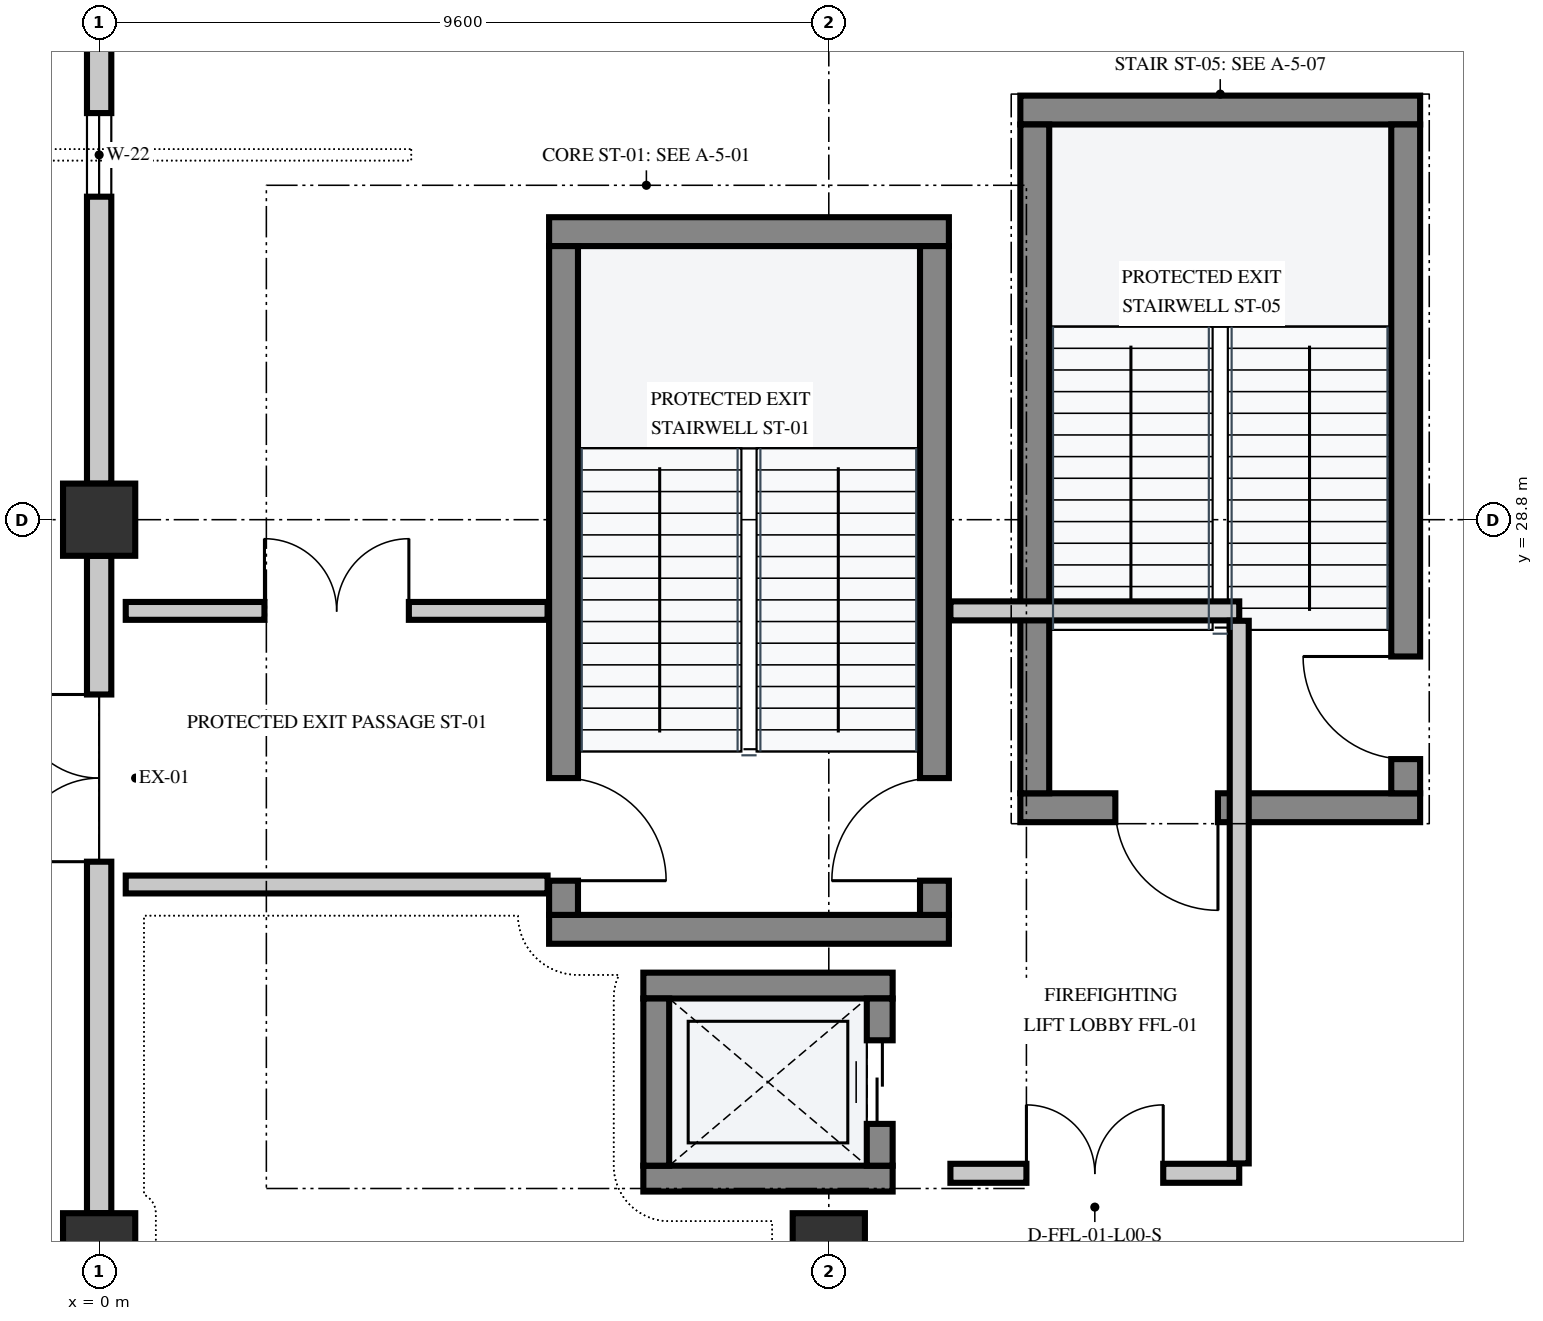
"""IFC4 building model, lengths in metres.
Left out: names, types, materials, properties, quantities, classifications, styles, units other than length and angle.
Written with IfcOpenShell. Run it as: python <this file> out.ifc"""

import sys

from ifc_helpers import new_model, si_unit, direction, frame, frame_2d, origin, origin_2d, place, context, subcontext, project, spatial, rectangle, extrude, element, fill, save


model = new_model("IFC4")
c1 = context("Model", 3, precision=1e-05, world=origin(), true_north=direction((0.0, 1.0)))
c2 = subcontext(c1, "Body", "Model", "MODEL_VIEW")
j1 = project(units=[si_unit("LENGTHUNIT", "METRE"), si_unit("PLANEANGLEUNIT", "RADIAN")], contexts=[c1])
p1 = place(None, origin())
s1 = spatial("IfcSite", under=j1, at=p1, CompositionType="ELEMENT")
p2 = place(p1, origin())
s2 = spatial("IfcBuilding", under=s1, at=p2, CompositionType="ELEMENT")
p3 = place(p2, origin())
s3 = spatial("IfcBuildingStorey", under=s2, at=p3, CompositionType="ELEMENT", Elevation=0.0)
for number, where, z_axis, x_axis in (
    (1, (0.0, 19.2, 0.0), (0.0, 0.0, 1.0), (1.0, 0.0, 0.0)),
    (2, (0.0, 28.8, 0.0), (0.0, 0.0, 1.0), (1.0, 0.0, 0.0)),
    (3, (9.6, 19.2, 0.0), (0.0, 0.0, 1.0), (1.0, 0.0, 0.0)),
):
    element("IfcColumn", number, at=place(p3, frame(where, z_axis=z_axis, x_axis=x_axis)), inside=s3, PredefinedType="COLUMN", context=c2, shape_type="SweptSolid", body=[
        extrude(rectangle(XDim=0.95, YDim=0.95, at=origin_2d()), origin(), (0.0, 0.0, 1.0), 5.4),
    ])
p4 = place(p3, frame((0.0, 19.675, 0.0), z_axis=(0.0, 0.0, 1.0), x_axis=(0.0, 1.0, 0.0)))
e4 = element("IfcWall", 4, at=p4, inside=s3, PredefinedType="SOLIDWALL", context=c2, shape_type="SweptSolid", body=[
    extrude(rectangle(XDim=8.65, YDim=0.32, at=frame_2d((4.325, 0.0))), origin(), (0.0, 0.0, 1.0), 5.09),
])
p5 = place(p4, frame((4.625, 0.0, 0.0)))
e5 = element("IfcOpeningElement", 5, at=p5, cuts=e4, PredefinedType="OPENING", context=c2, shape_type="SweptSolid", body=[
    extrude(rectangle(XDim=2.2, YDim=2.4, at=frame_2d((1.1, 1.2))), frame((0.0, 0.172, 0.0), z_axis=(0.0, -1.0, 0.0), x_axis=(1.0, 0.0, 0.0)), (0.0, 0.0, 1.0), 0.344),
])
p6 = place(p3, frame((0.0, 29.273, 0.0), z_axis=(0.0, 0.0, 1.0), x_axis=(0.0, 1.0, 0.0)))
e6 = element("IfcWall", 6, at=p6, inside=s3, PredefinedType="SOLIDWALL", context=c2, shape_type="SweptSolid", body=[
    extrude(rectangle(XDim=8.654, YDim=0.32, at=frame_2d((4.327, 0.0))), origin(), (0.0, 0.0, 1.0), 5.09),
])
p7 = place(p6, frame((3.777, 0.0, 1.25)))
e7 = element("IfcOpeningElement", 7, at=p7, cuts=e6, PredefinedType="OPENING", context=c2, shape_type="SweptSolid", body=[
    extrude(rectangle(XDim=1.1, YDim=1.35, at=frame_2d((0.55, 0.675))), frame((0.0, 0.172, 0.0), z_axis=(0.0, -1.0, 0.0), x_axis=(1.0, 0.0, 0.0)), (0.0, 0.0, 1.0), 0.344),
])
for number, where, z_axis, x_axis in (
    (8, (5.92, 23.41, 0.0), (0.0, 0.0, 1.0), (1.0, 0.0, 0.0)),
    (9, (5.92, 32.59, 0.0), (0.0, 0.0, 1.0), (1.0, 0.0, 0.0)),
):
    element("IfcWall", number, at=place(p3, frame(where, z_axis=z_axis, x_axis=x_axis)), inside=s3, PredefinedType="SHEAR", context=c2, shape_type="SweptSolid", body=[
        extrude(rectangle(XDim=5.26, YDim=0.38, at=frame_2d((2.63, 0.0))), origin(), (0.0, 0.0, 1.0), 5.09),
    ])
p8 = place(p3, frame((10.99, 23.6, 0.0), z_axis=(0.0, 0.0, 1.0), x_axis=(0.0, 1.0, 0.0)))
e10 = element("IfcWall", 10, at=p8, inside=s3, PredefinedType="SHEAR", context=c2, shape_type="SweptSolid", body=[
    extrude(rectangle(XDim=8.8, YDim=0.38, at=frame_2d((4.4, 0.0))), origin(), (0.0, 0.0, 1.0), 5.09),
])
p9 = place(p8, frame((0.45, 0.0, 0.0)))
e11 = element("IfcOpeningElement", 11, at=p9, cuts=e10, PredefinedType="OPENING", context=c2, shape_type="SweptSolid", body=[
    extrude(rectangle(XDim=1.35, YDim=2.2, at=frame_2d((0.675, 1.1))), frame((0.0, 0.202, 0.0), z_axis=(0.0, -1.0, 0.0), x_axis=(1.0, 0.0, 0.0)), (0.0, 0.0, 1.0), 0.404),
])
p10 = place(p3, frame((6.11, 23.6, 0.0), z_axis=(0.0, 0.0, 1.0), x_axis=(0.0, 1.0, 0.0)))
e12 = element("IfcWall", 12, at=p10, inside=s3, PredefinedType="SHEAR", context=c2, shape_type="SweptSolid", body=[
    extrude(rectangle(XDim=8.8, YDim=0.38, at=frame_2d((4.4, 0.0))), origin(), (0.0, 0.0, 1.0), 5.09),
])
p11 = place(p10, frame((0.45, 0.0, 0.0)))
e13 = element("IfcOpeningElement", 13, at=p11, cuts=e12, PredefinedType="OPENING", context=c2, shape_type="SweptSolid", body=[
    extrude(rectangle(XDim=1.35, YDim=2.2, at=frame_2d((0.675, 1.1))), frame((0.0, 0.202, 0.0), z_axis=(0.0, -1.0, 0.0), x_axis=(1.0, 0.0, 0.0)), (0.0, 0.0, 1.0), 0.404),
])
p12 = place(p3, frame((12.12, 25.01, 0.0), z_axis=(0.0, 0.0, 1.0), x_axis=(1.0, 0.0, 0.0)))
e14 = element("IfcWall", 14, at=p12, inside=s3, PredefinedType="SHEAR", context=c2, shape_type="SweptSolid", body=[
    extrude(rectangle(XDim=5.26, YDim=0.38, at=frame_2d((2.63, 0.0))), origin(), (0.0, 0.0, 1.0), 5.09),
])
p13 = place(p12, frame((1.25, 0.0, 0.0)))
e15 = element("IfcOpeningElement", 15, at=p13, cuts=e14, PredefinedType="OPENING", context=c2, shape_type="SweptSolid", body=[
    extrude(rectangle(XDim=1.35, YDim=2.2, at=frame_2d((0.675, 1.1))), frame((0.0, 0.202, 0.0), z_axis=(0.0, -1.0, 0.0), x_axis=(1.0, 0.0, 0.0)), (0.0, 0.0, 1.0), 0.404),
])
p14 = place(p3, frame((12.12, 34.19, 0.0), z_axis=(0.0, 0.0, 1.0), x_axis=(1.0, 0.0, 0.0)))
e16 = element("IfcWall", 16, at=p14, inside=s3, PredefinedType="SHEAR", context=c2, shape_type="SweptSolid", body=[
    extrude(rectangle(XDim=5.26, YDim=0.38, at=frame_2d((2.63, 0.0))), origin(), (0.0, 0.0, 1.0), 5.09),
])
p15 = place(p3, frame((17.19, 25.2, 0.0), z_axis=(0.0, 0.0, 1.0), x_axis=(0.0, 1.0, 0.0)))
e17 = element("IfcWall", 17, at=p15, inside=s3, PredefinedType="SHEAR", context=c2, shape_type="SweptSolid", body=[
    extrude(rectangle(XDim=8.8, YDim=0.38, at=frame_2d((4.4, 0.0))), origin(), (0.0, 0.0, 1.0), 5.09),
])
p16 = place(p15, frame((0.45, 0.0, 0.0)))
e18 = element("IfcOpeningElement", 18, at=p16, cuts=e17, PredefinedType="OPENING", context=c2, shape_type="SweptSolid", body=[
    extrude(rectangle(XDim=1.35, YDim=2.2, at=frame_2d((0.675, 1.1))), frame((0.0, 0.202, 0.0), z_axis=(0.0, -1.0, 0.0), x_axis=(1.0, 0.0, 0.0)), (0.0, 0.0, 1.0), 0.404),
])
p17 = place(p3, frame((12.31, 25.2, 0.0), z_axis=(0.0, 0.0, 1.0), x_axis=(0.0, 1.0, 0.0)))
e19 = element("IfcWall", 19, at=p17, inside=s3, PredefinedType="SHEAR", context=c2, shape_type="SweptSolid", body=[
    extrude(rectangle(XDim=8.8, YDim=0.38, at=frame_2d((4.4, 0.0))), origin(), (0.0, 0.0, 1.0), 5.09),
])
for number, where, z_axis, x_axis in (
    (20, (7.16, 20.13, 0.0), (0.0, 0.0, 1.0), (1.0, 0.0, 0.0)),
    (21, (7.16, 22.67, 0.0), (0.0, 0.0, 1.0), (1.0, 0.0, 0.0)),
):
    element("IfcWall", number, at=place(p3, frame(where, z_axis=z_axis, x_axis=x_axis)), inside=s3, PredefinedType="SHEAR", context=c2, shape_type="SweptSolid", body=[
        extrude(rectangle(XDim=3.28, YDim=0.34, at=frame_2d((1.64, 0.0))), origin(), (0.0, 0.0, 1.0), 5.09),
    ])
p18 = place(p3, frame((7.33, 20.3, 0.0), z_axis=(0.0, 0.0, 1.0), x_axis=(0.0, 1.0, 0.0)))
e22 = element("IfcWall", 22, at=p18, inside=s3, PredefinedType="SHEAR", context=c2, shape_type="SweptSolid", body=[
    extrude(rectangle(XDim=2.2, YDim=0.34, at=frame_2d((1.1, 0.0))), origin(), (0.0, 0.0, 1.0), 5.09),
])
p19 = place(p3, frame((10.27, 20.3, 0.0), z_axis=(0.0, 0.0, 1.0), x_axis=(0.0, 1.0, 0.0)))
e23 = element("IfcWall", 23, at=p19, inside=s3, PredefinedType="SHEAR", context=c2, shape_type="SweptSolid", body=[
    extrude(rectangle(XDim=2.2, YDim=0.34, at=frame_2d((1.1, 0.0))), origin(), (0.0, 0.0, 1.0), 5.09),
])
p20 = place(p19, frame((0.55, 0.0, 0.0)))
e24 = element("IfcOpeningElement", 24, at=p20, cuts=e23, PredefinedType="OPENING", context=c2, shape_type="SweptSolid", body=[
    extrude(rectangle(XDim=1.1, YDim=2.15, at=frame_2d((0.55, 1.075))), frame((0.0, 0.182, 0.0), z_axis=(0.0, -1.0, 0.0), x_axis=(1.0, 0.0, 0.0)), (0.0, 0.0, 1.0), 0.364),
])
p21 = place(p3, frame((11.2, 20.2, 0.0), z_axis=(0.0, 0.0, 1.0), x_axis=(1.0, 0.0, 0.0)))
e25 = element("IfcWall", 25, at=p21, inside=s3, PredefinedType="PARTITIONING", context=c2, shape_type="SweptSolid", body=[
    extrude(rectangle(XDim=3.8, YDim=0.25, at=frame_2d((1.9, 0.0))), origin(), (0.0, 0.0, 1.0), 5.09),
])
p22 = place(p21, frame((1.0, 0.0, 0.0)))
e26 = element("IfcOpeningElement", 26, at=p22, cuts=e25, PredefinedType="OPENING", context=c2, shape_type="SweptSolid", body=[
    extrude(rectangle(XDim=1.8, YDim=2.25, at=frame_2d((0.9, 1.125))), frame((0.0, 0.137, 0.0), z_axis=(0.0, -1.0, 0.0), x_axis=(1.0, 0.0, 0.0)), (0.0, 0.0, 1.0), 0.274),
])
p23 = place(p3, frame((11.2, 27.6, 0.0), z_axis=(0.0, 0.0, 1.0), x_axis=(1.0, 0.0, 0.0)))
e27 = element("IfcWall", 27, at=p23, inside=s3, PredefinedType="PARTITIONING", context=c2, shape_type="SweptSolid", body=[
    extrude(rectangle(XDim=3.8, YDim=0.25, at=frame_2d((1.9, 0.0))), origin(), (0.0, 0.0, 1.0), 5.09),
])
p24 = place(p3, frame((15.0, 20.33, 0.0), z_axis=(0.0, 0.0, 1.0), x_axis=(0.0, 1.0, 0.0)))
e28 = element("IfcWall", 28, at=p24, inside=s3, PredefinedType="PARTITIONING", context=c2, shape_type="SweptSolid", body=[
    extrude(rectangle(XDim=7.14, YDim=0.25, at=frame_2d((3.57, 0.0))), origin(), (0.0, 0.0, 1.0), 5.09),
])
p25 = place(p3, frame((0.35, 24.0, 0.0), z_axis=(0.0, 0.0, 1.0), x_axis=(1.0, 0.0, 0.0)))
e29 = element("IfcWall", 29, at=p25, inside=s3, PredefinedType="PARTITIONING", context=c2, shape_type="SweptSolid", body=[
    extrude(rectangle(XDim=5.55, YDim=0.235, at=frame_2d((2.775, 0.0))), origin(), (0.0, 0.0, 1.0), 5.09),
])
p26 = place(p3, frame((0.35, 27.6, 0.0), z_axis=(0.0, 0.0, 1.0), x_axis=(1.0, 0.0, 0.0)))
e30 = element("IfcWall", 30, at=p26, inside=s3, PredefinedType="PARTITIONING", context=c2, shape_type="SweptSolid", body=[
    extrude(rectangle(XDim=5.55, YDim=0.235, at=frame_2d((2.775, 0.0))), origin(), (0.0, 0.0, 1.0), 5.09),
])
p27 = place(p26, frame((1.825, 0.0, 0.0)))
e31 = element("IfcOpeningElement", 31, at=p27, cuts=e30, PredefinedType="OPENING", context=c2, shape_type="SweptSolid", body=[
    extrude(rectangle(XDim=1.9, YDim=2.25, at=frame_2d((0.95, 1.125))), frame((0.0, 0.129, 0.0), z_axis=(0.0, -1.0, 0.0), x_axis=(1.0, 0.0, 0.0)), (0.0, 0.0, 1.0), 0.259),
])
p28 = place(p5, origin())
e32 = element("IfcDoor", 32, at=p28, inside=s3, OperationType="DOUBLE_DOOR_SINGLE_SWING", PredefinedType="DOOR", context=c2, shape_type="SweptSolid", body=[
    extrude(rectangle(XDim=2.2, YDim=2.4, at=frame_2d((1.1, 1.2))), frame((0.0, 0.025, 0.0), z_axis=(0.0, -1.0, 0.0), x_axis=(1.0, 0.0, 0.0)), (0.0, 0.0, 1.0), 0.05),
])
fill(e5, e32)
p29 = place(p7, origin())
e33 = element("IfcWindow", 33, at=p29, inside=s3, PartitioningType="SINGLE_PANEL", PredefinedType="WINDOW", context=c2, shape_type="SweptSolid", body=[
    extrude(rectangle(XDim=1.1, YDim=1.35, at=frame_2d((0.55, 0.675))), frame((0.0, 0.03, 0.0), z_axis=(0.0, -1.0, 0.0), x_axis=(1.0, 0.0, 0.0)), (0.0, 0.0, 1.0), 0.06),
])
fill(e7, e33)
p30 = place(p9, origin())
e34 = element("IfcDoor", 34, at=p30, inside=s3, OperationType="SINGLE_SWING_LEFT", PredefinedType="DOOR", context=c2, shape_type="SweptSolid", body=[
    extrude(rectangle(XDim=1.35, YDim=2.2, at=frame_2d((0.675, 1.1))), frame((0.0, 0.025, 0.0), z_axis=(0.0, -1.0, 0.0), x_axis=(1.0, 0.0, 0.0)), (0.0, 0.0, 1.0), 0.05),
])
fill(e11, e34)
p31 = place(p11, frame((1.35, 0.0, 0.0), z_axis=(0.0, 0.0, 1.0), x_axis=(-1.0, 0.0, 0.0)))
e35 = element("IfcDoor", 35, at=p31, inside=s3, OperationType="SINGLE_SWING_RIGHT", PredefinedType="DOOR", context=c2, shape_type="SweptSolid", body=[
    extrude(rectangle(XDim=1.35, YDim=2.2, at=frame_2d((0.675, 1.1))), frame((0.0, 0.025, 0.0), z_axis=(0.0, -1.0, 0.0), x_axis=(1.0, 0.0, 0.0)), (0.0, 0.0, 1.0), 0.05),
])
fill(e13, e35)
p32 = place(p16, origin())
e36 = element("IfcDoor", 36, at=p32, inside=s3, OperationType="SINGLE_SWING_RIGHT", PredefinedType="DOOR", context=c2, shape_type="SweptSolid", body=[
    extrude(rectangle(XDim=1.35, YDim=2.2, at=frame_2d((0.675, 1.1))), frame((0.0, 0.025, 0.0), z_axis=(0.0, -1.0, 0.0), x_axis=(1.0, 0.0, 0.0)), (0.0, 0.0, 1.0), 0.05),
])
fill(e18, e36)
p33 = place(p13, frame((1.35, 0.0, 0.0), z_axis=(0.0, 0.0, 1.0), x_axis=(-1.0, 0.0, 0.0)))
e37 = element("IfcDoor", 37, at=p33, inside=s3, OperationType="SINGLE_SWING_LEFT", PredefinedType="DOOR", context=c2, shape_type="SweptSolid", body=[
    extrude(rectangle(XDim=1.35, YDim=2.2, at=frame_2d((0.675, 1.1))), frame((0.0, 0.025, 0.0), z_axis=(0.0, -1.0, 0.0), x_axis=(1.0, 0.0, 0.0)), (0.0, 0.0, 1.0), 0.05),
])
fill(e15, e37)
p34 = place(p20, origin())
e38 = element("IfcDoor", 38, at=p34, inside=s3, OperationType="DOUBLE_DOOR_SLIDING", PredefinedType="DOOR", context=c2, shape_type="SweptSolid", body=[
    extrude(rectangle(XDim=1.1, YDim=2.15, at=frame_2d((0.55, 1.075))), frame((0.0, 0.025, 0.0), z_axis=(0.0, -1.0, 0.0), x_axis=(1.0, 0.0, 0.0)), (0.0, 0.0, 1.0), 0.05),
])
fill(e24, e38)
p35 = place(p22, origin())
e39 = element("IfcDoor", 39, at=p35, inside=s3, OperationType="DOUBLE_DOOR_SINGLE_SWING", PredefinedType="DOOR", context=c2, shape_type="SweptSolid", body=[
    extrude(rectangle(XDim=1.8, YDim=2.25, at=frame_2d((0.9, 1.125))), frame((0.0, 0.025, 0.0), z_axis=(0.0, -1.0, 0.0), x_axis=(1.0, 0.0, 0.0)), (0.0, 0.0, 1.0), 0.05),
])
fill(e26, e39)
p36 = place(p27, origin())
e40 = element("IfcDoor", 40, at=p36, inside=s3, OperationType="DOUBLE_DOOR_SINGLE_SWING", PredefinedType="DOOR", context=c2, shape_type="SweptSolid", body=[
    extrude(rectangle(XDim=1.9, YDim=2.25, at=frame_2d((0.95, 1.125))), frame((0.0, 0.025, 0.0), z_axis=(0.0, -1.0, 0.0), x_axis=(1.0, 0.0, 0.0)), (0.0, 0.0, 1.0), 0.05),
])
fill(e31, e40)
save(model, sys.argv[1])
